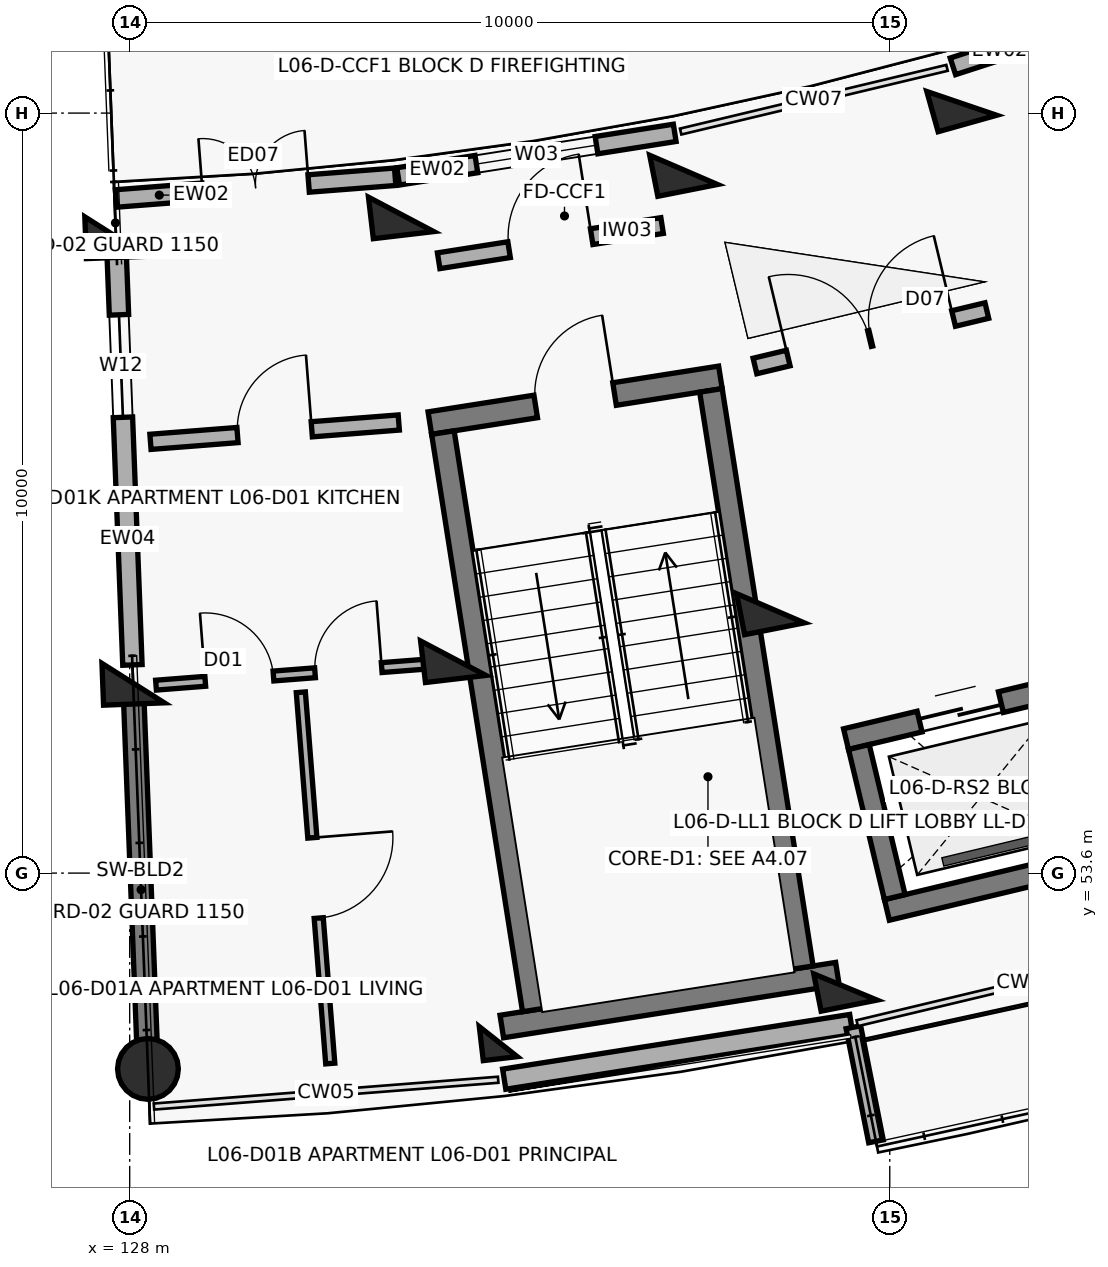
"""IFC4 building model, lengths in metres.
Left out: names, types, materials, properties, quantities, classifications, styles, units other than length and angle.
Written with IfcOpenShell. Run it as: python <this file> out.ifc"""

import sys

from ifc_helpers import new_model, si_unit, direction, frame, frame_2d, origin, origin_2d, place, context, subcontext, project, spatial, rectangle, circle, extrude, element, fill, save


model = new_model("IFC4")
c1 = context("Model", 3, precision=1e-05, world=origin(), true_north=direction((0.0, 1.0)))
c2 = subcontext(c1, "Body", "Model", "MODEL_VIEW")
j1 = project(units=[si_unit("LENGTHUNIT", "METRE"), si_unit("PLANEANGLEUNIT", "RADIAN")], contexts=[c1])
p1 = place(None, origin())
s1 = spatial("IfcSite", under=j1, at=p1, CompositionType="ELEMENT")
p2 = place(p1, origin())
s2 = spatial("IfcBuilding", under=s1, at=p2, CompositionType="ELEMENT")
p3 = place(p2, frame((0.0, 0.0, 20.5)))
s3 = spatial("IfcBuildingStorey", under=s2, at=p3, CompositionType="ELEMENT", Elevation=20.5)
for number, where, z_axis, x_axis in (
    (1, (127.82, 61.975, 0.0), (0.0, 0.0, 1.0), (0.038, -0.999, 0.0)),
    (2, (128.045, 56.1, 0.0), (0.0, 0.0, 1.0), (0.038, -0.999, 0.0)),
):
    element("IfcColumn", number, at=place(p3, frame(where, z_axis=z_axis, x_axis=x_axis)), inside=s3, PredefinedType="COLUMN", context=c2, shape_type="SweptSolid", body=[
        extrude(rectangle(XDim=0.55, YDim=0.8, at=origin_2d()), origin(), (0.0, 0.0, 1.0), 3.1),
    ])
p4 = place(p3, frame((128.24, 51.023, 0.0), z_axis=(0.0, 0.0, 1.0), x_axis=(0.038387809088, -0.999262916411, 0.0)))
e3 = element("IfcColumn", 3, at=p4, inside=s3, PredefinedType="COLUMN", context=c2, shape_type="SweptSolid", body=[
    extrude(circle(Radius=0.4, at=origin_2d()), origin(), (0.0, 0.0, 1.0), 3.1),
])
for number, where, z_axis, x_axis in (
    (4, (131.571, 62.267, 0.0), (0.0, 0.0, 1.0), (0.117, -0.993, 0.0)),
    (5, (132.257, 56.427, 0.0), (0.0, 0.0, 1.0), (0.117, -0.993, 0.0)),
):
    element("IfcColumn", number, at=place(p3, frame(where, z_axis=z_axis, x_axis=x_axis)), inside=s3, PredefinedType="COLUMN", context=c2, shape_type="SweptSolid", body=[
        extrude(rectangle(XDim=0.55, YDim=0.8, at=origin_2d()), origin(), (0.0, 0.0, 1.0), 3.1),
    ])
p5 = place(p3, frame((132.85, 51.382, 0.0), z_axis=(0.0, 0.0, 1.0), x_axis=(0.116670737099, -0.993170649538, 0.0)))
e6 = element("IfcColumn", 6, at=p5, inside=s3, PredefinedType="COLUMN", context=c2, shape_type="SweptSolid", body=[
    extrude(rectangle(XDim=0.45, YDim=0.45, at=origin_2d()), origin(), (0.0, 0.0, 1.0), 3.1),
])
for number, where, z_axis, x_axis in (
    (7, (135.288, 62.853, 0.0), (0.0, 0.0, 1.0), (0.194, -0.981, 0.0)),
    (8, (136.43, 57.085, 0.0), (0.0, 0.0, 1.0), (0.194, -0.981, 0.0)),
):
    element("IfcColumn", number, at=place(p3, frame(where, z_axis=z_axis, x_axis=x_axis)), inside=s3, PredefinedType="COLUMN", context=c2, shape_type="SweptSolid", body=[
        extrude(rectangle(XDim=0.55, YDim=0.8, at=origin_2d()), origin(), (0.0, 0.0, 1.0), 3.1),
    ])
p6 = place(p3, frame((137.417, 52.101, 0.0), z_axis=(0.0, 0.0, 1.0), x_axis=(0.19423435122, -0.980955155349, 0.0)))
e9 = element("IfcColumn", 9, at=p6, inside=s3, PredefinedType="COLUMN", context=c2, shape_type="SweptSolid", body=[
    extrude(rectangle(XDim=0.5, YDim=0.75, at=origin_2d()), origin(), (0.0, 0.0, 1.0), 3.1),
])
p7 = place(p3, frame((138.947, 63.728, 0.0), z_axis=(0.0, 0.0, 1.0), x_axis=(0.270600445976, -0.962691746426, 0.0)))
e10 = element("IfcColumn", 10, at=p7, inside=s3, PredefinedType="COLUMN", context=c2, shape_type="SweptSolid", body=[
    extrude(rectangle(XDim=0.55, YDim=0.8, at=origin_2d()), origin(), (0.0, 0.0, 1.0), 3.1),
])
p8 = place(p3, frame((128.052, 55.92, 0.0), z_axis=(0.0, 0.0, 1.0), x_axis=(0.038381471406, -0.99926315986, 0.0)))
e11 = element("IfcWall", 11, at=p8, inside=s3, PredefinedType="SHEAR", context=c2, shape_type="SweptSolid", body=[
    extrude(rectangle(XDim=4.72, YDim=0.27, at=frame_2d((2.36, 0.0))), origin(), (0.0, 0.0, 1.0), 2.86),
])
p9 = place(p3, frame((127.82, 62.477, 0.0), z_axis=(0.0, 0.0, 1.0), x_axis=(0.996988621344, 0.077547978126, 0.0)))
e12 = element("IfcWall", 12, at=p9, inside=s3, PredefinedType="SOLIDWALL", context=c2, shape_type="SweptSolid", body=[
    extrude(rectangle(XDim=3.683, YDim=0.23, at=frame_2d((1.842, 0.0))), origin(), (0.0, 0.0, 1.0), 2.25),
])
p10 = place(p9, frame((1.142, 0.0, 0.0)))
e13 = element("IfcOpeningElement", 13, at=p10, cuts=e12, PredefinedType="OPENING", context=c2, shape_type="SweptSolid", body=[
    extrude(rectangle(XDim=1.4, YDim=2.15, at=frame_2d((0.7, 1.075))), frame((0.0, 0.125, 0.0), z_axis=(0.0, -1.0, 0.0), x_axis=(1.0, 0.0, 0.0)), (0.0, 0.0, 1.0), 0.25),
])
p11 = place(p3, frame((132.928, 50.889, 0.0), z_axis=(0.0, 0.0, 1.0), x_axis=(0.987828826394, 0.155544880165, 0.0)))
e14 = element("IfcWall", 14, at=p11, inside=s3, PredefinedType="SOLIDWALL", context=c2, shape_type="SweptSolid", body=[
    extrude(rectangle(XDim=4.622, YDim=0.268, at=frame_2d((2.311, 0.0))), origin(), (0.0, 0.0, 1.0), 2.25),
])
p12 = place(p3, frame((131.532, 62.767, 0.0), z_axis=(0.0, 0.0, 1.0), x_axis=(0.987816646119, 0.155622214512, 0.0)))
e15 = element("IfcWall", 15, at=p12, inside=s3, PredefinedType="SOLIDWALL", context=c2, shape_type="SweptSolid", body=[
    extrude(rectangle(XDim=3.684, YDim=0.23, at=frame_2d((1.842, 0.0))), origin(), (0.0, 0.0, 1.0), 2.25),
])
p13 = place(p12, frame((1.042, 0.0, 0.32)))
e16 = element("IfcOpeningElement", 16, at=p13, cuts=e15, PredefinedType="OPENING", context=c2, shape_type="SweptSolid", body=[
    extrude(rectangle(XDim=1.6, YDim=1.5, at=frame_2d((0.8, 0.75))), frame((0.0, 0.125, 0.0), z_axis=(0.0, -1.0, 0.0), x_axis=(1.0, 0.0, 0.0)), (0.0, 0.0, 1.0), 0.25),
])
p14 = place(p3, frame((137.521, 51.572, 0.0), z_axis=(0.0, 0.0, 1.0), x_axis=(0.194213040361, -0.980959374772, 0.0)))
e17 = element("IfcWall", 17, at=p14, inside=s3, PredefinedType="PARAPET", context=c2, shape_type="SweptSolid", body=[
    extrude(rectangle(XDim=1.53, YDim=0.195, at=frame_2d((0.765, 0.0))), origin(), (0.0, 0.0, 1.0), 2.25),
])
p15 = place(p3, frame((138.831, 64.215, 0.0), z_axis=(0.0, 0.0, 1.0), x_axis=(0.951320548791, 0.308203201552, 0.0)))
e18 = element("IfcWall", 18, at=p15, inside=s3, PredefinedType="SOLIDWALL", context=c2, shape_type="SweptSolid", body=[
    extrude(rectangle(XDim=3.683, YDim=0.23, at=frame_2d((1.842, 0.0))), origin(), (0.0, 0.0, 1.0), 2.25),
])
p16 = place(p15, frame((1.292, 0.0, 0.0)))
e19 = element("IfcOpeningElement", 19, at=p16, cuts=e18, PredefinedType="OPENING", context=c2, shape_type="SweptSolid", body=[
    extrude(rectangle(XDim=1.1, YDim=2.15, at=frame_2d((0.55, 1.075))), frame((0.0, 0.125, 0.0), z_axis=(0.0, -1.0, 0.0), x_axis=(1.0, 0.0, 0.0)), (0.0, 0.0, 1.0), 0.25),
])
p17 = place(p3, frame((127.829, 61.736, 0.0), z_axis=(0.0, 0.0, 1.0), x_axis=(0.038384504742, -0.999263043345, 0.0)))
e20 = element("IfcWall", 20, at=p17, inside=s3, PredefinedType="SOLIDWALL", context=c2, shape_type="SweptSolid", body=[
    extrude(rectangle(XDim=5.4, YDim=0.255, at=frame_2d((2.7, 0.0))), origin(), (0.0, 0.0, 1.0), 2.18),
])
p18 = place(p17, frame((0.79, 0.0, 0.75)))
e21 = element("IfcOpeningElement", 21, at=p18, cuts=e20, PredefinedType="OPENING", context=c2, shape_type="SweptSolid", body=[
    extrude(rectangle(XDim=1.35, YDim=1.35, at=frame_2d((0.675, 0.675))), frame((0.0, 0.137, 0.0), z_axis=(0.0, -1.0, 0.0), x_axis=(1.0, 0.0, 0.0)), (0.0, 0.0, 1.0), 0.275),
])
p19 = place(p3, frame((131.949, 59.521, 0.0), z_axis=(0.0, 0.0, 1.0), x_axis=(0.98782579805, 0.155564111245, 0.0)))
e22 = element("IfcWall", 22, at=p19, inside=s3, PredefinedType="SHEAR", context=c2, shape_type="SweptSolid", body=[
    extrude(rectangle(XDim=3.87, YDim=0.3, at=frame_2d((1.935, 0.0))), origin(), (0.0, 0.0, 1.0), 3.1),
])
p20 = place(p19, frame((1.41, 0.0, 0.0)))
e23 = element("IfcOpeningElement", 23, at=p20, cuts=e22, PredefinedType="OPENING", context=c2, shape_type="SweptSolid", body=[
    extrude(rectangle(XDim=1.05, YDim=2.15, at=frame_2d((0.525, 1.075))), frame((0.0, 0.16, 0.0), z_axis=(0.0, -1.0, 0.0), x_axis=(1.0, 0.0, 0.0)), (0.0, 0.0, 1.0), 0.32),
])
p21 = place(p3, frame((132.896, 51.581, 0.0), z_axis=(0.0, 0.0, 1.0), x_axis=(0.987819142769, 0.155606366126, 0.0)))
e24 = element("IfcWall", 24, at=p21, inside=s3, PredefinedType="SHEAR", context=c2, shape_type="SweptSolid", body=[
    extrude(rectangle(XDim=4.47, YDim=0.3, at=frame_2d((2.235, 0.0))), origin(), (0.0, 0.0, 1.0), 3.1),
])
p22 = place(p3, frame((132.121, 59.396, 0.0), z_axis=(0.0, 0.0, 1.0), x_axis=(0.155563141844, -0.987825950712, 0.0)))
e25 = element("IfcWall", 25, at=p22, inside=s3, PredefinedType="SHEAR", context=c2, shape_type="SweptSolid", body=[
    extrude(rectangle(XDim=7.69, YDim=0.3, at=frame_2d((3.845, 0.0))), origin(), (0.0, 0.0, 1.0), 3.1),
])
p23 = place(p3, frame((135.647, 59.951, 0.0), z_axis=(0.0, 0.0, 1.0), x_axis=(0.155568020624, -0.987825182388, 0.0)))
e26 = element("IfcWall", 26, at=p23, inside=s3, PredefinedType="SHEAR", context=c2, shape_type="SweptSolid", body=[
    extrude(rectangle(XDim=7.69, YDim=0.3, at=frame_2d((3.845, 0.0))), origin(), (0.0, 0.0, 1.0), 3.1),
])
p24 = place(p3, frame((137.425, 55.362, 0.0), z_axis=(0.0, 0.0, 1.0), x_axis=(0.972573452388, 0.232595958069, 0.0)))
e27 = element("IfcWall", 27, at=p24, inside=s3, PredefinedType="SHEAR", context=c2, shape_type="SweptSolid", body=[
    extrude(rectangle(XDim=3.09, YDim=0.28, at=frame_2d((1.545, 0.0))), origin(), (0.0, 0.0, 1.0), 3.1),
])
p25 = place(p24, frame((0.995, 0.0, 0.0)))
e28 = element("IfcOpeningElement", 28, at=p25, cuts=e27, PredefinedType="OPENING", context=c2, shape_type="SweptSolid", body=[
    extrude(rectangle(XDim=1.1, YDim=2.15, at=frame_2d((0.55, 1.075))), frame((0.0, 0.15, 0.0), z_axis=(0.0, -1.0, 0.0), x_axis=(1.0, 0.0, 0.0)), (0.0, 0.0, 1.0), 0.3),
])
p26 = place(p3, frame((137.962, 53.116, 0.0), z_axis=(0.0, 0.0, 1.0), x_axis=(0.972573452388, 0.232595958069, 0.0)))
e29 = element("IfcWall", 29, at=p26, inside=s3, PredefinedType="SHEAR", context=c2, shape_type="SweptSolid", body=[
    extrude(rectangle(XDim=3.09, YDim=0.28, at=frame_2d((1.545, 0.0))), origin(), (0.0, 0.0, 1.0), 3.1),
])
p27 = place(p3, frame((137.594, 55.259, 0.0), z_axis=(0.0, 0.0, 1.0), x_axis=(0.232590524316, -0.972574751882, 0.0)))
e30 = element("IfcWall", 30, at=p27, inside=s3, PredefinedType="SHEAR", context=c2, shape_type="SweptSolid", body=[
    extrude(rectangle(XDim=2.03, YDim=0.28, at=frame_2d((1.015, 0.0))), origin(), (0.0, 0.0, 1.0), 3.1),
])
p28 = place(p3, frame((128.273, 59.274, 0.0), z_axis=(0.0, 0.0, 1.0), x_axis=(0.996982624396, 0.077625038827, 0.0)))
e31 = element("IfcWall", 31, at=p28, inside=s3, PredefinedType="SOLIDWALL", context=c2, shape_type="SweptSolid", body=[
    extrude(rectangle(XDim=3.277, YDim=0.2, at=frame_2d((1.639, 0.0))), origin(), (0.0, 0.0, 1.0), 2.08),
])
p29 = place(p28, frame((1.148, 0.0, 0.0)))
e32 = element("IfcOpeningElement", 32, at=p29, cuts=e31, PredefinedType="OPENING", context=c2, shape_type="SweptSolid", body=[
    extrude(rectangle(XDim=0.98, YDim=2.15, at=frame_2d((0.49, 1.075))), frame((0.0, 0.11, 0.0), z_axis=(0.0, -1.0, 0.0), x_axis=(1.0, 0.0, 0.0)), (0.0, 0.0, 1.0), 0.22),
])
p30 = place(p3, frame((128.346, 56.073, 0.0), z_axis=(0.0, 0.0, 1.0), x_axis=(0.996986014478, 0.077581485773, 0.0)))
e33 = element("IfcWall", 33, at=p30, inside=s3, PredefinedType="PARTITIONING", context=c2, shape_type="SweptSolid", body=[
    extrude(rectangle(XDim=3.628, YDim=0.13, at=frame_2d((1.814, 0.0))), origin(), (0.0, 0.0, 1.0), 2.08),
])
p31 = place(p30, frame((0.65, 0.0, 0.0)))
e34 = element("IfcOpeningElement", 34, at=p31, cuts=e33, PredefinedType="OPENING", context=c2, shape_type="SweptSolid", body=[
    extrude(rectangle(XDim=0.9, YDim=2.1, at=frame_2d((0.45, 1.05))), frame((0.0, 0.075, 0.0), z_axis=(0.0, -1.0, 0.0), x_axis=(1.0, 0.0, 0.0)), (0.0, 0.0, 1.0), 0.15),
])
p32 = place(p30, frame((2.098, 0.0, 0.0)))
e35 = element("IfcOpeningElement", 35, at=p32, cuts=e33, PredefinedType="OPENING", context=c2, shape_type="SweptSolid", body=[
    extrude(rectangle(XDim=0.88, YDim=2.1, at=frame_2d((0.44, 1.05))), frame((0.0, 0.075, 0.0), z_axis=(0.0, -1.0, 0.0), x_axis=(1.0, 0.0, 0.0)), (0.0, 0.0, 1.0), 0.15),
])
p33 = place(p3, frame((130.251, 55.979, 0.0), z_axis=(0.0, 0.0, 1.0), x_axis=(0.079073860253, -0.99686875998, 0.0)))
e36 = element("IfcWall", 36, at=p33, inside=s3, PredefinedType="PARTITIONING", context=c2, shape_type="SweptSolid", body=[
    extrude(rectangle(XDim=4.9, YDim=0.12, at=frame_2d((2.45, 0.0))), origin(), (0.0, 0.0, 1.0), 2.08),
])
p34 = place(p33, frame((1.92, 0.0, 0.0)))
e37 = element("IfcOpeningElement", 37, at=p34, cuts=e36, PredefinedType="OPENING", context=c2, shape_type="SweptSolid", body=[
    extrude(rectangle(XDim=1.06, YDim=2.1, at=frame_2d((0.53, 1.05))), frame((0.0, 0.07, 0.0), z_axis=(0.0, -1.0, 0.0), x_axis=(1.0, 0.0, 0.0)), (0.0, 0.0, 1.0), 0.14),
])
p35 = place(p3, frame((132.065, 61.657, 0.0), z_axis=(0.0, 0.0, 1.0), x_axis=(0.987816121487, 0.155625544594, 0.0)))
e38 = element("IfcWall", 38, at=p35, inside=s3, PredefinedType="SOLIDWALL", context=c2, shape_type="SweptSolid", body=[
    extrude(rectangle(XDim=2.976, YDim=0.21, at=frame_2d((1.488, 0.0))), origin(), (0.0, 0.0, 1.0), 2.08),
])
p36 = place(p35, frame((0.938, 0.0, 0.0)))
e39 = element("IfcOpeningElement", 39, at=p36, cuts=e38, PredefinedType="OPENING", context=c2, shape_type="SweptSolid", body=[
    extrude(rectangle(XDim=1.1, YDim=2.15, at=frame_2d((0.55, 1.075))), frame((0.0, 0.115, 0.0), z_axis=(0.0, -1.0, 0.0), x_axis=(1.0, 0.0, 0.0)), (0.0, 0.0, 1.0), 0.23),
])
p37 = place(p3, frame((136.227, 60.272, 0.0), z_axis=(0.0, 0.0, 1.0), x_axis=(0.972564346632, 0.232634029456, 0.0)))
e40 = element("IfcWall", 40, at=p37, inside=s3, PredefinedType="SOLIDWALL", context=c2, shape_type="SweptSolid", body=[
    extrude(rectangle(XDim=3.137, YDim=0.21, at=frame_2d((1.568, 0.0))), origin(), (0.0, 0.0, 1.0), 2.08),
])
p38 = place(p37, frame((0.45, 0.0, 0.0)))
e41 = element("IfcOpeningElement", 41, at=p38, cuts=e40, PredefinedType="OPENING", context=c2, shape_type="SweptSolid", body=[
    extrude(rectangle(XDim=1.1, YDim=2.15, at=frame_2d((0.55, 1.075))), frame((0.0, 0.115, 0.0), z_axis=(0.0, -1.0, 0.0), x_axis=(1.0, 0.0, 0.0)), (0.0, 0.0, 1.0), 0.23),
])
p39 = place(p37, frame((1.567, 0.0, 0.0)))
e42 = element("IfcOpeningElement", 42, at=p39, cuts=e40, PredefinedType="OPENING", context=c2, shape_type="SweptSolid", body=[
    extrude(rectangle(XDim=1.12, YDim=2.15, at=frame_2d((0.56, 1.075))), frame((0.0, 0.115, 0.0), z_axis=(0.0, -1.0, 0.0), x_axis=(1.0, 0.0, 0.0)), (0.0, 0.0, 1.0), 0.23),
])
p40 = place(p10, origin())
e43 = element("IfcDoor", 43, at=p40, inside=s3, OperationType="DOUBLE_DOOR_SINGLE_SWING", PredefinedType="DOOR", context=c2, shape_type="SweptSolid", body=[
    extrude(rectangle(XDim=1.4, YDim=2.15, at=frame_2d((0.7, 1.075))), frame((0.0, 0.025, 0.0), z_axis=(0.0, -1.0, 0.0), x_axis=(1.0, 0.0, 0.0)), (0.0, 0.0, 1.0), 0.05),
])
fill(e13, e43)
p41 = place(p13, origin())
e44 = element("IfcWindow", 44, at=p41, inside=s3, PartitioningType="DOUBLE_PANEL_VERTICAL", PredefinedType="WINDOW", context=c2, shape_type="SweptSolid", body=[
    extrude(rectangle(XDim=1.6, YDim=1.5, at=frame_2d((0.8, 0.75))), frame((0.0, 0.03, 0.0), z_axis=(0.0, -1.0, 0.0), x_axis=(1.0, 0.0, 0.0)), (0.0, 0.0, 1.0), 0.06),
])
fill(e16, e44)
p42 = place(p18, origin())
e45 = element("IfcWindow", 45, at=p42, inside=s3, PartitioningType="DOUBLE_PANEL_VERTICAL", PredefinedType="WINDOW", context=c2, shape_type="SweptSolid", body=[
    extrude(rectangle(XDim=1.35, YDim=1.35, at=frame_2d((0.675, 0.675))), frame((0.0, 0.03, 0.0), z_axis=(0.0, -1.0, 0.0), x_axis=(1.0, 0.0, 0.0)), (0.0, 0.0, 1.0), 0.06),
])
fill(e21, e45)
p43 = place(p20, origin())
e46 = element("IfcDoor", 46, at=p43, inside=s3, OperationType="SINGLE_SWING_RIGHT", PredefinedType="DOOR", context=c2, shape_type="SweptSolid", body=[
    extrude(rectangle(XDim=1.05, YDim=2.15, at=frame_2d((0.525, 1.075))), frame((0.0, 0.025, 0.0), z_axis=(0.0, -1.0, 0.0), x_axis=(1.0, 0.0, 0.0)), (0.0, 0.0, 1.0), 0.05),
])
fill(e23, e46)
p44 = place(p25, origin())
e47 = element("IfcDoor", 47, at=p44, inside=s3, OperationType="DOUBLE_DOOR_SLIDING", PredefinedType="DOOR", context=c2, shape_type="SweptSolid", body=[
    extrude(rectangle(XDim=1.1, YDim=2.15, at=frame_2d((0.55, 1.075))), frame((0.0, 0.025, 0.0), z_axis=(0.0, -1.0, 0.0), x_axis=(1.0, 0.0, 0.0)), (0.0, 0.0, 1.0), 0.05),
])
fill(e28, e47)
p45 = place(p29, origin())
e48 = element("IfcDoor", 48, at=p45, inside=s3, OperationType="SINGLE_SWING_RIGHT", PredefinedType="DOOR", context=c2, shape_type="SweptSolid", body=[
    extrude(rectangle(XDim=0.98, YDim=2.15, at=frame_2d((0.49, 1.075))), frame((0.0, 0.025, 0.0), z_axis=(0.0, -1.0, 0.0), x_axis=(1.0, 0.0, 0.0)), (0.0, 0.0, 1.0), 0.05),
])
fill(e32, e48)
p46 = place(p31, origin())
e49 = element("IfcDoor", 49, at=p46, inside=s3, OperationType="SINGLE_SWING_LEFT", PredefinedType="DOOR", context=c2, shape_type="SweptSolid", body=[
    extrude(rectangle(XDim=0.9, YDim=2.1, at=frame_2d((0.45, 1.05))), frame((0.0, 0.025, 0.0), z_axis=(0.0, -1.0, 0.0), x_axis=(1.0, 0.0, 0.0)), (0.0, 0.0, 1.0), 0.05),
])
fill(e34, e49)
p47 = place(p32, origin())
e50 = element("IfcDoor", 50, at=p47, inside=s3, OperationType="SINGLE_SWING_RIGHT", PredefinedType="DOOR", context=c2, shape_type="SweptSolid", body=[
    extrude(rectangle(XDim=0.88, YDim=2.1, at=frame_2d((0.44, 1.05))), frame((0.0, 0.025, 0.0), z_axis=(0.0, -1.0, 0.0), x_axis=(1.0, 0.0, 0.0)), (0.0, 0.0, 1.0), 0.05),
])
fill(e35, e50)
p48 = place(p34, origin())
e51 = element("IfcDoor", 51, at=p48, inside=s3, OperationType="SINGLE_SWING_LEFT", PredefinedType="DOOR", context=c2, shape_type="SweptSolid", body=[
    extrude(rectangle(XDim=1.06, YDim=2.1, at=frame_2d((0.53, 1.05))), frame((0.0, 0.025, 0.0), z_axis=(0.0, -1.0, 0.0), x_axis=(1.0, 0.0, 0.0)), (0.0, 0.0, 1.0), 0.05),
])
fill(e37, e51)
p49 = place(p36, origin())
e52 = element("IfcDoor", 52, at=p49, inside=s3, OperationType="SINGLE_SWING_RIGHT", PredefinedType="DOOR", context=c2, shape_type="SweptSolid", body=[
    extrude(rectangle(XDim=1.1, YDim=2.15, at=frame_2d((0.55, 1.075))), frame((0.0, 0.025, 0.0), z_axis=(0.0, -1.0, 0.0), x_axis=(1.0, 0.0, 0.0)), (0.0, 0.0, 1.0), 0.05),
])
fill(e39, e52)
p50 = place(p38, origin())
e53 = element("IfcDoor", 53, at=p50, inside=s3, OperationType="SINGLE_SWING_LEFT", PredefinedType="DOOR", context=c2, shape_type="SweptSolid", body=[
    extrude(rectangle(XDim=1.1, YDim=2.15, at=frame_2d((0.55, 1.075))), frame((0.0, 0.025, 0.0), z_axis=(0.0, -1.0, 0.0), x_axis=(1.0, 0.0, 0.0)), (0.0, 0.0, 1.0), 0.05),
])
fill(e41, e53)
p51 = place(p39, origin())
e54 = element("IfcDoor", 54, at=p51, inside=s3, OperationType="SINGLE_SWING_RIGHT", PredefinedType="DOOR", context=c2, shape_type="SweptSolid", body=[
    extrude(rectangle(XDim=1.12, YDim=2.15, at=frame_2d((0.56, 1.075))), frame((0.0, 0.025, 0.0), z_axis=(0.0, -1.0, 0.0), x_axis=(1.0, 0.0, 0.0)), (0.0, 0.0, 1.0), 0.05),
])
fill(e42, e54)
save(model, sys.argv[1])
